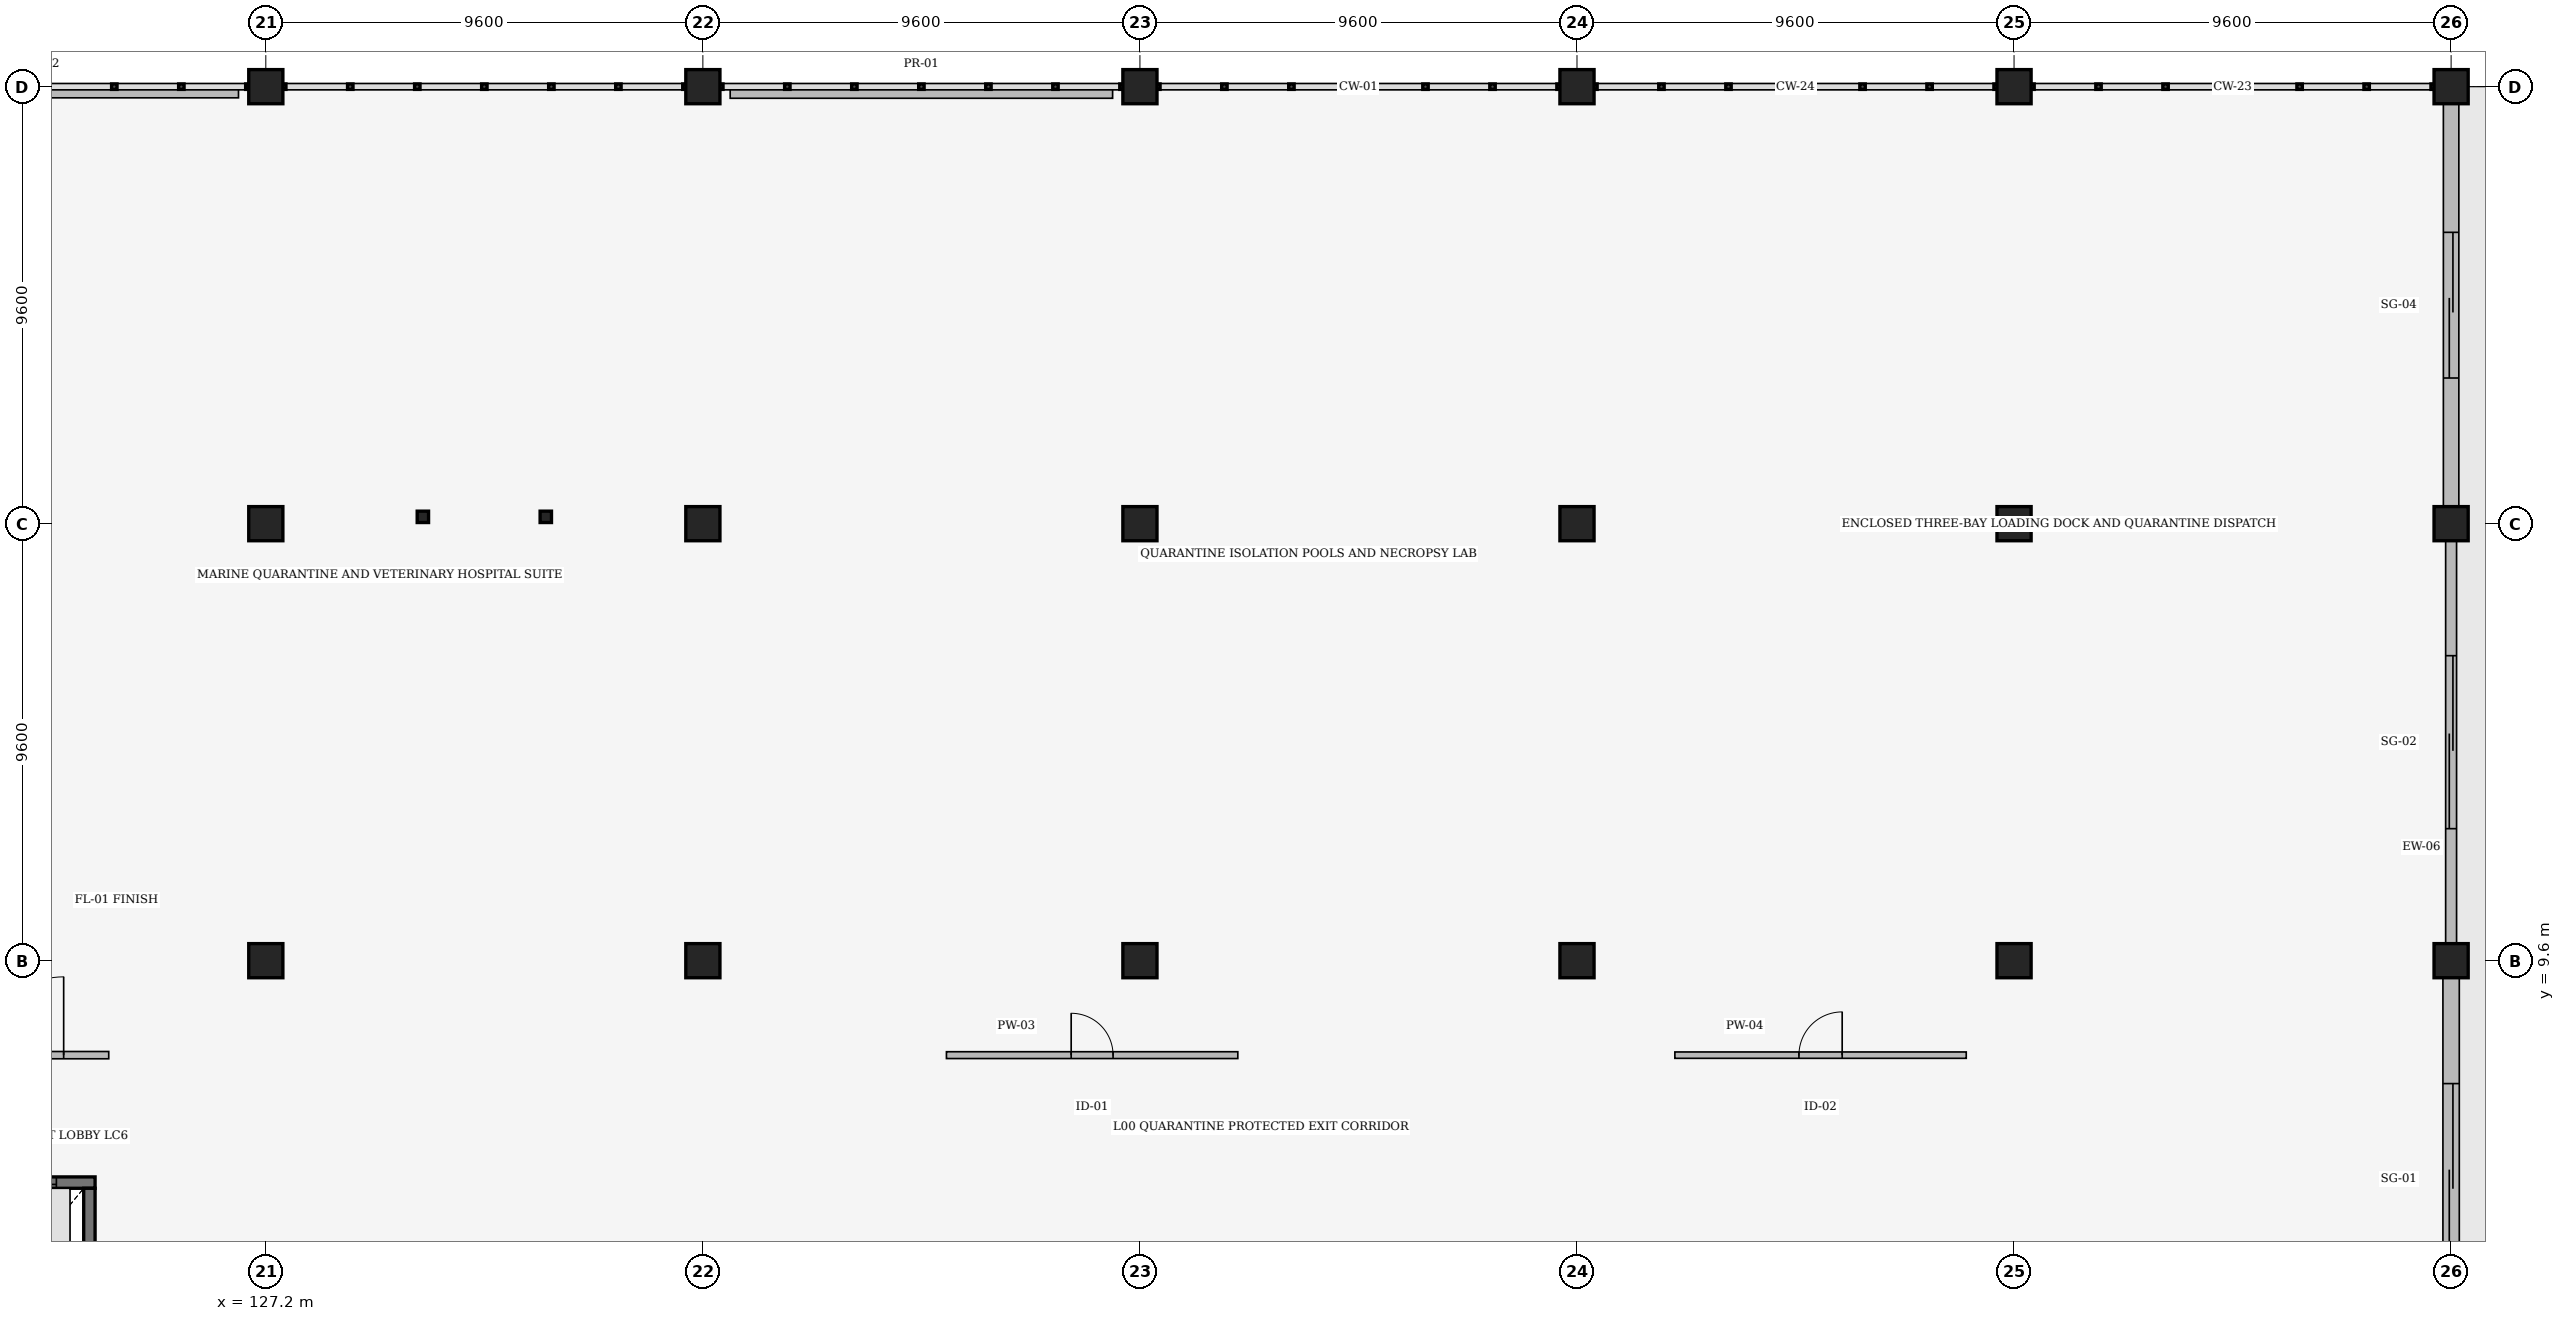
"""IFC4 building model, lengths in metres.
Left out: names, types, materials, properties, quantities, classifications, styles, units other than length and angle.
Written with IfcOpenShell. Run it as: python <this file> out.ifc"""

import sys

from ifc_helpers import new_model, si_unit, direction, frame, frame_2d, origin, origin_2d, place, context, subcontext, project, spatial, rectangle, hollow_rectangle, extrude, element, fill, save


model = new_model("IFC4")
c1 = context("Model", 3, precision=1e-05, world=origin(), true_north=direction((0.0, 1.0)))
c2 = subcontext(c1, "Body", "Model", "MODEL_VIEW")
j1 = project(units=[si_unit("LENGTHUNIT", "METRE"), si_unit("PLANEANGLEUNIT", "RADIAN")], contexts=[c1])
p1 = place(None, origin())
s1 = spatial("IfcSite", under=j1, at=p1, CompositionType="ELEMENT")
p2 = place(p1, origin())
s2 = spatial("IfcBuilding", under=s1, at=p2, CompositionType="ELEMENT")
p3 = place(p2, origin())
s3 = spatial("IfcBuildingStorey", under=s2, at=p3, CompositionType="ELEMENT", Elevation=0.0)
for number, where, z_axis, x_axis in (
    (1, (127.2, 9.6, 0.0), (0.0, 0.0, 1.0), (1.0, 0.0, 0.0)),
    (2, (127.2, 19.2, 0.0), (0.0, 0.0, 1.0), (1.0, 0.0, 0.0)),
    (3, (127.2, 28.8, 0.0), (0.0, 0.0, 1.0), (1.0, 0.0, 0.0)),
    (4, (136.8, 9.6, 0.0), (0.0, 0.0, 1.0), (1.0, 0.0, 0.0)),
    (5, (136.8, 19.2, 0.0), (0.0, 0.0, 1.0), (1.0, 0.0, 0.0)),
    (6, (136.8, 28.8, 0.0), (0.0, 0.0, 1.0), (1.0, 0.0, 0.0)),
    (7, (146.4, 9.6, 0.0), (0.0, 0.0, 1.0), (1.0, 0.0, 0.0)),
    (8, (146.4, 19.2, 0.0), (0.0, 0.0, 1.0), (1.0, 0.0, 0.0)),
    (9, (146.4, 28.8, 0.0), (0.0, 0.0, 1.0), (1.0, 0.0, 0.0)),
    (10, (156.0, 9.6, 0.0), (0.0, 0.0, 1.0), (1.0, 0.0, 0.0)),
    (11, (156.0, 19.2, 0.0), (0.0, 0.0, 1.0), (1.0, 0.0, 0.0)),
    (12, (156.0, 28.8, 0.0), (0.0, 0.0, 1.0), (1.0, 0.0, 0.0)),
    (13, (165.6, 9.6, 0.0), (0.0, 0.0, 1.0), (1.0, 0.0, 0.0)),
    (14, (165.6, 19.2, 0.0), (0.0, 0.0, 1.0), (1.0, 0.0, 0.0)),
    (15, (165.6, 28.8, 0.0), (0.0, 0.0, 1.0), (1.0, 0.0, 0.0)),
    (16, (175.2, 9.6, 0.0), (0.0, 0.0, 1.0), (1.0, 0.0, 0.0)),
    (17, (175.2, 19.2, 0.0), (0.0, 0.0, 1.0), (1.0, 0.0, 0.0)),
    (18, (175.2, 28.8, 0.0), (0.0, 0.0, 1.0), (1.0, 0.0, 0.0)),
):
    element("IfcColumn", number, at=place(p3, frame(where, z_axis=z_axis, x_axis=x_axis)), inside=s3, PredefinedType="COLUMN", context=c2, shape_type="SweptSolid", body=[
        extrude(rectangle(XDim=0.75, YDim=0.75, at=origin_2d()), origin(), (0.0, 0.0, 1.0), 5.4),
    ])
for number, where, z_axis, x_axis in (
    (19, (130.65, 19.35, 0.0), (0.0, 0.0, 1.0), (1.0, 0.0, 0.0)),
    (20, (133.35, 19.35, 0.0), (0.0, 0.0, 1.0), (1.0, 0.0, 0.0)),
):
    element("IfcColumn", number, at=place(p3, frame(where, z_axis=z_axis, x_axis=x_axis)), inside=s3, PredefinedType="COLUMN", context=c2, shape_type="SweptSolid", body=[
        extrude(hollow_rectangle(XDim=0.25, YDim=0.25, WallThickness=0.012, InnerFilletRadius=0.012, OuterFilletRadius=0.025, at=origin_2d()), origin(), (0.0, 0.0, 1.0), 4.651),
    ])
p4 = place(p3, frame((175.2, 0.383, 0.0), z_axis=(0.0, 0.0, 1.0), x_axis=(0.0, 1.0, 0.0)))
e21 = element("IfcWall", 21, at=p4, inside=s3, PredefinedType="SOLIDWALL", context=c2, shape_type="SweptSolid", body=[
    extrude(rectangle(XDim=8.834, YDim=0.36, at=frame_2d((4.417, 0.0))), origin(), (0.0, 0.0, 1.0), 5.047),
])
p5 = place(p4, frame((6.517, 0.0, 0.0), z_axis=(0.0, 0.0, 1.0), x_axis=(-1.0, 0.0, 0.0)))
e22 = element("IfcOpeningElement", 22, at=p5, cuts=e21, PredefinedType="OPENING", context=c2, shape_type="SweptSolid", body=[
    extrude(rectangle(XDim=4.2, YDim=3.6, at=frame_2d((2.1, 1.8))), frame((0.0, 0.19, 0.0), z_axis=(0.0, -1.0, 0.0), x_axis=(1.0, 0.0, 0.0)), (0.0, 0.0, 1.0), 0.38),
])
p6 = place(p3, frame((175.2, 9.983, 0.0), z_axis=(0.0, 0.0, 1.0), x_axis=(0.0, 1.0, 0.0)))
e23 = element("IfcWall", 23, at=p6, inside=s3, PredefinedType="SOLIDWALL", context=c2, shape_type="SweptSolid", body=[
    extrude(rectangle(XDim=8.834, YDim=0.24, at=frame_2d((4.417, 0.0))), origin(), (0.0, 0.0, 1.0), 5.054),
])
p7 = place(p6, frame((6.317, 0.0, 0.0), z_axis=(0.0, 0.0, 1.0), x_axis=(-1.0, 0.0, 0.0)))
e24 = element("IfcOpeningElement", 24, at=p7, cuts=e23, PredefinedType="OPENING", context=c2, shape_type="SweptSolid", body=[
    extrude(rectangle(XDim=3.8, YDim=3.5, at=frame_2d((1.9, 1.75))), frame((0.0, 0.13, 0.0), z_axis=(0.0, -1.0, 0.0), x_axis=(1.0, 0.0, 0.0)), (0.0, 0.0, 1.0), 0.26),
])
p8 = place(p3, frame((175.2, 19.583, 0.0), z_axis=(0.0, 0.0, 1.0), x_axis=(0.0, 1.0, 0.0)))
e25 = element("IfcWall", 25, at=p8, inside=s3, PredefinedType="SOLIDWALL", context=c2, shape_type="SweptSolid", body=[
    extrude(rectangle(XDim=8.834, YDim=0.34, at=frame_2d((4.417, 0.0))), origin(), (0.0, 0.0, 1.0), 5.06),
])
p9 = place(p8, frame((6.017, 0.0, 0.0), z_axis=(0.0, 0.0, 1.0), x_axis=(-1.0, 0.0, 0.0)))
e26 = element("IfcOpeningElement", 26, at=p9, cuts=e25, PredefinedType="OPENING", context=c2, shape_type="SweptSolid", body=[
    extrude(rectangle(XDim=3.2, YDim=3.0, at=frame_2d((1.6, 1.5))), frame((0.0, 0.18, 0.0), z_axis=(0.0, -1.0, 0.0), x_axis=(1.0, 0.0, 0.0)), (0.0, 0.0, 1.0), 0.36),
])
p10 = place(p3, frame((108.6, 28.65, 5.4), z_axis=(0.0, 0.0, 1.0), x_axis=(1.0, 0.0, 0.0)))
e27 = element("IfcWall", 27, at=p10, inside=s3, PredefinedType="PARAPET", context=c2, shape_type="SweptSolid", body=[
    extrude(rectangle(XDim=18.0, YDim=0.19, at=frame_2d((9.0, 0.0))), origin(), (0.0, 0.0, 1.0), 0.55),
])
p11 = place(p3, frame((137.4, 28.65, 5.4), z_axis=(0.0, 0.0, 1.0), x_axis=(1.0, 0.0, 0.0)))
e28 = element("IfcWall", 28, at=p11, inside=s3, PredefinedType="PARAPET", context=c2, shape_type="SweptSolid", body=[
    extrude(rectangle(XDim=8.4, YDim=0.21, at=frame_2d((4.2, 0.0))), origin(), (0.0, 0.0, 1.0), 0.55),
])
p12 = place(p3, frame((120.15, 4.725, 0.0), z_axis=(0.0, 0.0, 1.0), x_axis=(1.0, 0.0, 0.0)))
e29 = element("IfcWall", 29, at=p12, inside=s3, PredefinedType="SHEAR", context=c2, shape_type="SweptSolid", body=[
    extrude(rectangle(XDim=3.3, YDim=0.25, at=frame_2d((1.65, 0.0))), origin(), (0.0, 0.0, 1.0), 5.05),
])
p13 = place(p12, frame((0.85, 0.0, 0.0)))
e30 = element("IfcOpeningElement", 30, at=p13, cuts=e29, PredefinedType="OPENING", context=c2, shape_type="SweptSolid", body=[
    extrude(rectangle(XDim=1.6, YDim=2.3, at=frame_2d((0.8, 1.15))), frame((0.0, 0.135, 0.0), z_axis=(0.0, -1.0, 0.0), x_axis=(1.0, 0.0, 0.0)), (0.0, 0.0, 1.0), 0.27),
])
p14 = place(p3, frame((123.325, 1.2, 0.0), z_axis=(0.0, 0.0, 1.0), x_axis=(0.0, 1.0, 0.0)))
e31 = element("IfcWall", 31, at=p14, inside=s3, PredefinedType="SHEAR", context=c2, shape_type="SweptSolid", body=[
    extrude(rectangle(XDim=3.4, YDim=0.25, at=frame_2d((1.7, 0.0))), origin(), (0.0, 0.0, 1.0), 5.05),
])
p15 = place(p3, frame((120.05, 7.525, 0.0), z_axis=(0.0, 0.0, 1.0), x_axis=(1.0, 0.0, 0.0)))
e32 = element("IfcWall", 32, at=p15, inside=s3, PredefinedType="PARTITIONING", context=c2, shape_type="SweptSolid", body=[
    extrude(rectangle(XDim=3.7, YDim=0.16, at=frame_2d((1.85, 0.0))), origin(), (0.0, 0.0, 1.0), 4.764),
])
p16 = place(p15, frame((0.99, 0.0, 0.0)))
e33 = element("IfcOpeningElement", 33, at=p16, cuts=e32, PredefinedType="OPENING", context=c2, shape_type="SweptSolid", body=[
    extrude(rectangle(XDim=1.72, YDim=2.38, at=frame_2d((0.86, 1.19))), frame((0.0, 0.09, 0.0), z_axis=(0.0, -1.0, 0.0), x_axis=(1.0, 0.0, 0.0)), (0.0, 0.0, 1.0), 0.18),
])
p17 = place(p3, frame((142.15, 7.525, 0.0), z_axis=(0.0, 0.0, 1.0), x_axis=(1.0, 0.0, 0.0)))
e34 = element("IfcWall", 34, at=p17, inside=s3, PredefinedType="PARTITIONING", context=c2, shape_type="SweptSolid", body=[
    extrude(rectangle(XDim=6.4, YDim=0.15, at=frame_2d((3.2, 0.0))), origin(), (0.0, 0.0, 1.0), 4.547),
])
p18 = place(p17, frame((2.74, 0.0, 0.0)))
e35 = element("IfcOpeningElement", 35, at=p18, cuts=e34, PredefinedType="OPENING", context=c2, shape_type="SweptSolid", body=[
    extrude(rectangle(XDim=0.92, YDim=2.12, at=frame_2d((0.46, 1.06))), frame((0.0, 0.085, 0.0), z_axis=(0.0, -1.0, 0.0), x_axis=(1.0, 0.0, 0.0)), (0.0, 0.0, 1.0), 0.17),
])
p19 = place(p3, frame((158.15, 7.525, 0.0), z_axis=(0.0, 0.0, 1.0), x_axis=(1.0, 0.0, 0.0)))
e36 = element("IfcWall", 36, at=p19, inside=s3, PredefinedType="PARTITIONING", context=c2, shape_type="SweptSolid", body=[
    extrude(rectangle(XDim=6.4, YDim=0.14, at=frame_2d((3.2, 0.0))), origin(), (0.0, 0.0, 1.0), 5.04),
])
p20 = place(p19, frame((2.725, 0.0, 0.0)))
e37 = element("IfcOpeningElement", 37, at=p20, cuts=e36, PredefinedType="OPENING", context=c2, shape_type="SweptSolid", body=[
    extrude(rectangle(XDim=0.95, YDim=2.15, at=frame_2d((0.475, 1.075))), frame((0.0, 0.08, 0.0), z_axis=(0.0, -1.0, 0.0), x_axis=(1.0, 0.0, 0.0)), (0.0, 0.0, 1.0), 0.16),
])
p21 = place(p5, origin())
e38 = element("IfcDoor", 38, at=p21, inside=s3, OperationType="ROLLINGUP", PredefinedType="GATE", context=c2, shape_type="SweptSolid", body=[
    extrude(rectangle(XDim=4.2, YDim=3.6, at=frame_2d((2.1, 1.8))), frame((0.0, 0.025, 0.0), z_axis=(0.0, -1.0, 0.0), x_axis=(1.0, 0.0, 0.0)), (0.0, 0.0, 1.0), 0.05),
])
fill(e22, e38)
p22 = place(p7, origin())
e39 = element("IfcDoor", 39, at=p22, inside=s3, OperationType="ROLLINGUP", PredefinedType="GATE", context=c2, shape_type="SweptSolid", body=[
    extrude(rectangle(XDim=3.8, YDim=3.5, at=frame_2d((1.9, 1.75))), frame((0.0, 0.025, 0.0), z_axis=(0.0, -1.0, 0.0), x_axis=(1.0, 0.0, 0.0)), (0.0, 0.0, 1.0), 0.05),
])
fill(e24, e39)
p23 = place(p9, origin())
e40 = element("IfcDoor", 40, at=p23, inside=s3, OperationType="ROLLINGUP", PredefinedType="GATE", context=c2, shape_type="SweptSolid", body=[
    extrude(rectangle(XDim=3.2, YDim=3.0, at=frame_2d((1.6, 1.5))), frame((0.0, 0.025, 0.0), z_axis=(0.0, -1.0, 0.0), x_axis=(1.0, 0.0, 0.0)), (0.0, 0.0, 1.0), 0.05),
])
fill(e26, e40)
p24 = place(p13, origin())
e41 = element("IfcDoor", 41, at=p24, inside=s3, OperationType="DOUBLE_DOOR_SLIDING", PredefinedType="DOOR", context=c2, shape_type="SweptSolid", body=[
    extrude(rectangle(XDim=1.6, YDim=2.3, at=frame_2d((0.8, 1.15))), frame((0.0, 0.025, 0.0), z_axis=(0.0, -1.0, 0.0), x_axis=(1.0, 0.0, 0.0)), (0.0, 0.0, 1.0), 0.05),
])
fill(e30, e41)
p25 = place(p16, origin())
e42 = element("IfcDoor", 42, at=p25, inside=s3, OperationType="SINGLE_SWING_RIGHT", PredefinedType="DOOR", context=c2, shape_type="SweptSolid", body=[
    extrude(rectangle(XDim=1.72, YDim=2.38, at=frame_2d((0.86, 1.19))), frame((0.0, 0.025, 0.0), z_axis=(0.0, -1.0, 0.0), x_axis=(1.0, 0.0, 0.0)), (0.0, 0.0, 1.0), 0.05),
])
fill(e33, e42)
p26 = place(p18, origin())
e43 = element("IfcDoor", 43, at=p26, inside=s3, OperationType="SINGLE_SWING_LEFT", PredefinedType="DOOR", context=c2, shape_type="SweptSolid", body=[
    extrude(rectangle(XDim=0.92, YDim=2.12, at=frame_2d((0.46, 1.06))), frame((0.0, 0.025, 0.0), z_axis=(0.0, -1.0, 0.0), x_axis=(1.0, 0.0, 0.0)), (0.0, 0.0, 1.0), 0.05),
])
fill(e35, e43)
p27 = place(p20, origin())
e44 = element("IfcDoor", 44, at=p27, inside=s3, OperationType="SINGLE_SWING_RIGHT", PredefinedType="DOOR", context=c2, shape_type="SweptSolid", body=[
    extrude(rectangle(XDim=0.95, YDim=2.15, at=frame_2d((0.475, 1.075))), frame((0.0, 0.025, 0.0), z_axis=(0.0, -1.0, 0.0), x_axis=(1.0, 0.0, 0.0)), (0.0, 0.0, 1.0), 0.05),
])
fill(e37, e44)
save(model, sys.argv[1])
